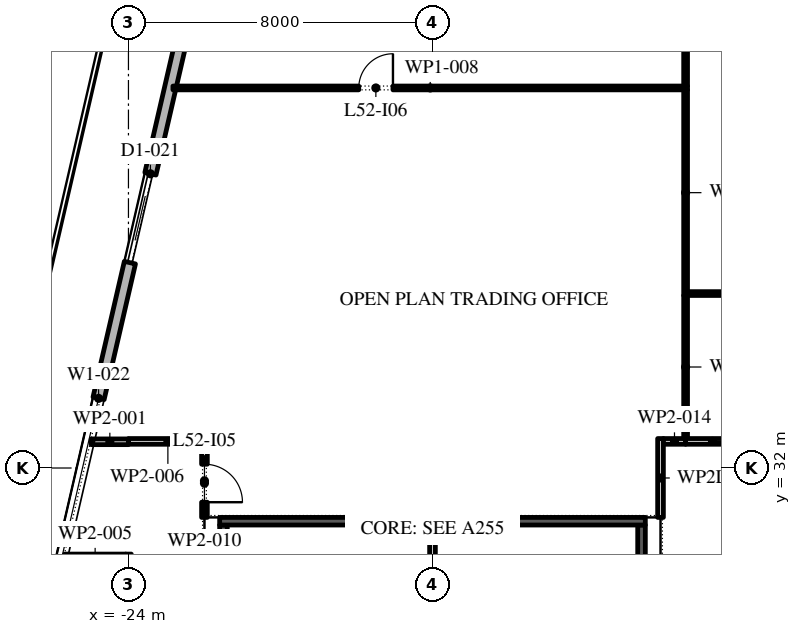
"""IFC4 building model, lengths in metres.
Left out: names, types, materials, properties, quantities, classifications, styles, units other than length and angle.
Written with IfcOpenShell. Run it as: python <this file> out.ifc"""

import sys

from ifc_helpers import new_model, si_unit, direction, frame, frame_2d, origin, origin_2d, place, context, subcontext, project, spatial, rectangle, extrude, element, fill, save


model = new_model("IFC4")
c1 = context("Model", 3, precision=1e-05, world=origin(), true_north=direction((0.0, 1.0)))
c2 = subcontext(c1, "Body", "Model", "MODEL_VIEW")
j1 = project(units=[si_unit("LENGTHUNIT", "METRE"), si_unit("PLANEANGLEUNIT", "RADIAN")], contexts=[c1])
p1 = place(None, origin())
s1 = spatial("IfcSite", under=j1, at=p1, CompositionType="ELEMENT")
p2 = place(p1, origin())
s2 = spatial("IfcBuilding", under=s1, at=p2, CompositionType="ELEMENT")
p3 = place(p2, frame((0.0, 0.0, 243.0)))
s3 = spatial("IfcBuildingStorey", under=s2, at=p3, CompositionType="ELEMENT", Elevation=243.0)
p4 = place(p3, frame((-26.658, 37.062, 0.0), z_axis=(0.014617783326, 0.063169706518, 0.99789574034), x_axis=(-0.974255315496, 0.225447511024, 0.0)))
e1 = element("IfcColumn", 1, at=p4, inside=s3, PredefinedType="COLUMN", context=c2, shape_type="SweptSolid", body=[
    extrude(rectangle(XDim=1.1, YDim=1.1, at=origin_2d()), origin(), (0.0, 0.0, 1.0), 4.209),
])
p5 = place(p3, frame((29.616, 40.758, 0.0), z_axis=(0.0, 0.0, 1.0), x_axis=(-0.974370532314, 0.224949029246, 0.0)))
e2 = element("IfcWall", 2, at=p5, inside=s3, PredefinedType="STANDARD", context=c2, shape_type="SweptSolid", body=[
    extrude(rectangle(XDim=48.0, YDim=0.3, at=frame_2d((24.0, 0.0))), origin(), (0.0, 0.0, 1.0), 4.0),
])
p6 = place(p5, frame((1.625, 0.0, 0.45)))
e3 = element("IfcOpeningElement", 3, at=p6, cuts=e2, PredefinedType="OPENING", context=c2, shape_type="SweptSolid", body=[
    extrude(rectangle(XDim=4.5, YDim=2.675, at=frame_2d((2.25, 1.337))), frame((0.0, 0.16, 0.0), z_axis=(0.0, -1.0, 0.0), x_axis=(1.0, 0.0, 0.0)), (0.0, 0.0, 1.0), 0.32),
])
p7 = place(p5, frame((9.975, 0.0, 0.0)))
e4 = element("IfcOpeningElement", 4, at=p7, cuts=e2, PredefinedType="OPENING", context=c2, shape_type="SweptSolid", body=[
    extrude(rectangle(XDim=2.4, YDim=3.5, at=frame_2d((1.2, 1.75))), frame((0.0, 0.16, 0.0), z_axis=(0.0, -1.0, 0.0), x_axis=(1.0, 0.0, 0.0)), (0.0, 0.0, 1.0), 0.32),
])
p8 = place(p5, frame((17.575, 0.0, 0.45)))
e5 = element("IfcOpeningElement", 5, at=p8, cuts=e2, PredefinedType="OPENING", context=c2, shape_type="SweptSolid", body=[
    extrude(rectangle(XDim=4.5, YDim=2.575, at=frame_2d((2.25, 1.288))), frame((0.0, 0.16, 0.0), z_axis=(0.0, -1.0, 0.0), x_axis=(1.0, 0.0, 0.0)), (0.0, 0.0, 1.0), 0.32),
])
p9 = place(p5, frame((25.625, 0.0, 0.45)))
e6 = element("IfcOpeningElement", 6, at=p9, cuts=e2, PredefinedType="OPENING", context=c2, shape_type="SweptSolid", body=[
    extrude(rectangle(XDim=4.5, YDim=2.45, at=frame_2d((2.25, 1.225))), frame((0.0, 0.16, 0.0), z_axis=(0.0, -1.0, 0.0), x_axis=(1.0, 0.0, 0.0)), (0.0, 0.0, 1.0), 0.32),
])
p10 = place(p5, frame((33.675, 0.0, 0.45)))
e7 = element("IfcOpeningElement", 7, at=p10, cuts=e2, PredefinedType="OPENING", context=c2, shape_type="SweptSolid", body=[
    extrude(rectangle(XDim=4.5, YDim=2.45, at=frame_2d((2.25, 1.225))), frame((0.0, 0.16, 0.0), z_axis=(0.0, -1.0, 0.0), x_axis=(1.0, 0.0, 0.0)), (0.0, 0.0, 1.0), 0.32),
])
p11 = place(p5, frame((42.775, 0.0, 0.0)))
e8 = element("IfcOpeningElement", 8, at=p11, cuts=e2, PredefinedType="OPENING", context=c2, shape_type="SweptSolid", body=[
    extrude(rectangle(XDim=2.4, YDim=3.5, at=frame_2d((1.2, 1.75))), frame((0.0, 0.16, 0.0), z_axis=(0.0, -1.0, 0.0), x_axis=(1.0, 0.0, 0.0)), (0.0, 0.0, 1.0), 0.32),
])
p12 = place(p3, frame((-21.359, 48.678, 0.0), z_axis=(0.0, 0.0, 1.0), x_axis=(-0.224949198343, -0.974370493275, 0.0)))
e9 = element("IfcWall", 9, at=p12, inside=s3, PredefinedType="STANDARD", context=c2, shape_type="SweptSolid", body=[
    extrude(rectangle(XDim=49.5, YDim=0.3, at=frame_2d((24.75, 0.0))), origin(), (0.0, 0.0, 1.0), 4.0),
])
p13 = place(p12, frame((1.157, 0.0, 0.45)))
e10 = element("IfcOpeningElement", 10, at=p13, cuts=e9, PredefinedType="OPENING", context=c2, shape_type="SweptSolid", body=[
    extrude(rectangle(XDim=4.5, YDim=3.05, at=frame_2d((2.25, 1.525))), frame((0.0, 0.16, 0.0), z_axis=(0.0, -1.0, 0.0), x_axis=(1.0, 0.0, 0.0)), (0.0, 0.0, 1.0), 0.32),
])
p14 = place(p12, frame((9.171, 0.0, 0.0)))
e11 = element("IfcOpeningElement", 11, at=p14, cuts=e9, PredefinedType="OPENING", context=c2, shape_type="SweptSolid", body=[
    extrude(rectangle(XDim=2.4, YDim=3.5, at=frame_2d((1.2, 1.75))), frame((0.0, 0.16, 0.0), z_axis=(0.0, -1.0, 0.0), x_axis=(1.0, 0.0, 0.0)), (0.0, 0.0, 1.0), 0.32),
])
p15 = place(p12, frame((15.236, 0.0, 0.45)))
e12 = element("IfcOpeningElement", 12, at=p15, cuts=e9, PredefinedType="OPENING", context=c2, shape_type="SweptSolid", body=[
    extrude(rectangle(XDim=4.5, YDim=3.05, at=frame_2d((2.25, 1.525))), frame((0.0, 0.16, 0.0), z_axis=(0.0, -1.0, 0.0), x_axis=(1.0, 0.0, 0.0)), (0.0, 0.0, 1.0), 0.32),
])
p16 = place(p12, frame((22.35, 0.0, 0.45)))
e13 = element("IfcOpeningElement", 13, at=p16, cuts=e9, PredefinedType="OPENING", context=c2, shape_type="SweptSolid", body=[
    extrude(rectangle(XDim=4.5, YDim=3.05, at=frame_2d((2.25, 1.525))), frame((0.0, 0.16, 0.0), z_axis=(0.0, -1.0, 0.0), x_axis=(1.0, 0.0, 0.0)), (0.0, 0.0, 1.0), 0.32),
])
p17 = place(p12, frame((29.464, 0.0, 0.45)))
e14 = element("IfcOpeningElement", 14, at=p17, cuts=e9, PredefinedType="OPENING", context=c2, shape_type="SweptSolid", body=[
    extrude(rectangle(XDim=4.5, YDim=3.05, at=frame_2d((2.25, 1.525))), frame((0.0, 0.16, 0.0), z_axis=(0.0, -1.0, 0.0), x_axis=(1.0, 0.0, 0.0)), (0.0, 0.0, 1.0), 0.32),
])
p18 = place(p12, frame((37.628, 0.0, 0.0)))
e15 = element("IfcOpeningElement", 15, at=p18, cuts=e9, PredefinedType="OPENING", context=c2, shape_type="SweptSolid", body=[
    extrude(rectangle(XDim=2.4, YDim=3.325, at=frame_2d((1.2, 1.663))), frame((0.0, 0.16, 0.0), z_axis=(0.0, -1.0, 0.0), x_axis=(1.0, 0.0, 0.0)), (0.0, 0.0, 1.0), 0.32),
])
p19 = place(p12, frame((43.693, 0.0, 0.45)))
e16 = element("IfcOpeningElement", 16, at=p19, cuts=e9, PredefinedType="OPENING", context=c2, shape_type="SweptSolid", body=[
    extrude(rectangle(XDim=4.5, YDim=2.825, at=frame_2d((2.25, 1.413))), frame((0.0, 0.16, 0.0), z_axis=(0.0, -1.0, 0.0), x_axis=(1.0, 0.0, 0.0)), (0.0, 0.0, 1.0), 0.32),
])
p20 = place(p3, frame((-21.5, 25.75, 0.0), z_axis=(0.0, 0.0, 1.0), x_axis=(0.0, 1.0, 0.0)))
e17 = element("IfcWall", 17, at=p20, inside=s3, PredefinedType="SHEAR", context=c2, shape_type="SweptSolid", body=[
    extrude(rectangle(XDim=4.75, YDim=0.2, at=frame_2d((2.375, 0.0))), origin(), (0.0, 0.0, 1.0), 4.0),
])
p21 = place(p20, frame((1.925, 0.0, 0.0)))
e18 = element("IfcOpeningElement", 18, at=p21, cuts=e17, PredefinedType="OPENING", context=c2, shape_type="SweptSolid", body=[
    extrude(rectangle(XDim=0.9, YDim=2.1, at=frame_2d((0.45, 1.05))), frame((0.0, 0.11, 0.0), z_axis=(0.0, -1.0, 0.0), x_axis=(1.0, 0.0, 0.0)), (0.0, 0.0, 1.0), 0.22),
])
p22 = place(p3, frame((-10.5, 25.75, 0.0), z_axis=(0.0, 0.0, 1.0), x_axis=(0.0, 1.0, 0.0)))
e19 = element("IfcWall", 19, at=p22, inside=s3, PredefinedType="SHEAR", context=c2, shape_type="SweptSolid", body=[
    extrude(rectangle(XDim=4.75, YDim=0.2, at=frame_2d((2.375, 0.0))), origin(), (0.0, 0.0, 1.0), 4.0),
])
p23 = place(p22, frame((1.925, 0.0, 0.0)))
e20 = element("IfcOpeningElement", 20, at=p23, cuts=e19, PredefinedType="OPENING", context=c2, shape_type="SweptSolid", body=[
    extrude(rectangle(XDim=0.9, YDim=2.1, at=frame_2d((0.45, 1.05))), frame((0.0, 0.11, 0.0), z_axis=(0.0, -1.0, 0.0), x_axis=(1.0, 0.0, 0.0)), (0.0, 0.0, 1.0), 0.22),
])
p24 = place(p3, frame((-21.6, 30.6, 0.0), z_axis=(0.0, 0.0, 1.0), x_axis=(1.0, 0.0, 0.0)))
e21 = element("IfcWall", 21, at=p24, inside=s3, PredefinedType="SHEAR", context=c2, shape_type="SweptSolid", body=[
    extrude(rectangle(XDim=11.2, YDim=0.2, at=frame_2d((5.6, 0.0))), origin(), (0.0, 0.0, 1.0), 4.0),
])
p25 = place(p3, frame((-16.0, 25.75, 0.0), z_axis=(0.0, 0.0, 1.0), x_axis=(0.0, 1.0, 0.0)))
e22 = element("IfcWall", 22, at=p25, inside=s3, PredefinedType="PARTITIONING", context=c2, shape_type="SweptSolid", body=[
    extrude(rectangle(XDim=4.75, YDim=0.15, at=frame_2d((2.375, 0.0))), origin(), (0.0, 0.0, 1.0), 4.0),
])
p26 = place(p3, frame((-24.979, 32.69, 0.0), z_axis=(0.0, 0.0, 1.0), x_axis=(1.0, 0.0, 0.0)))
e23 = element("IfcWall", 23, at=p26, inside=s3, PredefinedType="PARTITIONING", context=c2, shape_type="SweptSolid", body=[
    extrude(rectangle(XDim=0.979, YDim=0.15, at=frame_2d((0.49, 0.0))), origin(), (0.0, 0.0, 1.0), 4.0),
])
p27 = place(p3, frame((-24.0, 32.7, 0.0), z_axis=(0.0, 0.0, 1.0), x_axis=(1.0, 0.0, 0.0)))
e24 = element("IfcWall", 24, at=p27, inside=s3, PredefinedType="PARTITIONING", context=c2, shape_type="SweptSolid", body=[
    extrude(rectangle(XDim=2.075, YDim=0.15, at=frame_2d((1.038, 0.0))), origin(), (0.0, 0.0, 1.0), 4.0),
])
p28 = place(p3, frame((-22.829, 42.0, 0.0), z_axis=(0.0, 0.0, 1.0), x_axis=(1.0, 0.0, 0.0)))
e25 = element("IfcWall", 25, at=p28, inside=s3, PredefinedType="PARTITIONING", context=c2, shape_type="SweptSolid", body=[
    extrude(rectangle(XDim=13.539, YDim=0.1, at=frame_2d((6.77, 0.0))), origin(), (0.0, 0.0, 1.0), 4.0),
])
p29 = place(p28, frame((4.889, 0.0, 0.0)))
e26 = element("IfcOpeningElement", 26, at=p29, cuts=e25, PredefinedType="OPENING", context=c2, shape_type="SweptSolid", body=[
    extrude(rectangle(XDim=0.9, YDim=2.1, at=frame_2d((0.45, 1.05))), frame((0.0, 0.06, 0.0), z_axis=(0.0, -1.0, 0.0), x_axis=(1.0, 0.0, 0.0)), (0.0, 0.0, 1.0), 0.12),
])
p30 = place(p3, frame((-22.0, 32.625, 0.0), z_axis=(0.0, 0.0, 1.0), x_axis=(0.0, -1.0, 0.0)))
e27 = element("IfcWall", 27, at=p30, inside=s3, PredefinedType="PARTITIONING", context=c2, shape_type="SweptSolid", body=[
    extrude(rectangle(XDim=1.925, YDim=0.15, at=frame_2d((0.962, 0.0))), origin(), (0.0, 0.0, 1.0), 4.0),
])
p31 = place(p30, frame((0.525, 0.0, 0.0)))
e28 = element("IfcOpeningElement", 28, at=p31, cuts=e27, PredefinedType="OPENING", context=c2, shape_type="SweptSolid", body=[
    extrude(rectangle(XDim=1.0, YDim=2.1, at=frame_2d((0.5, 1.05))), frame((0.0, 0.085, 0.0), z_axis=(0.0, -1.0, 0.0), x_axis=(1.0, 0.0, 0.0)), (0.0, 0.0, 1.0), 0.17),
])
p32 = place(p3, frame((-10.0, 30.7, 0.0), z_axis=(0.0, 0.0, 1.0), x_axis=(0.0, 1.0, 0.0)))
e29 = element("IfcWall", 29, at=p32, inside=s3, PredefinedType="PARTITIONING", context=c2, shape_type="SweptSolid", body=[
    extrude(rectangle(XDim=2.075, YDim=0.15, at=frame_2d((1.038, 0.0))), origin(), (0.0, 0.0, 1.0), 3.02),
])
p33 = place(p3, frame((-9.925, 32.7, 0.0), z_axis=(0.0, 0.0, 1.0), x_axis=(1.0, 0.0, 0.0)))
e30 = element("IfcWall", 30, at=p33, inside=s3, PredefinedType="PARTITIONING", context=c2, shape_type="SweptSolid", body=[
    extrude(rectangle(XDim=0.585, YDim=0.15, at=frame_2d((0.292, 0.0))), origin(), (0.0, 0.0, 1.0), 4.0),
])
p34 = place(p3, frame((-9.34, 32.775, 0.0), z_axis=(0.0, 0.0, 1.0), x_axis=(0.0, 1.0, 0.0)))
e31 = element("IfcWall", 31, at=p34, inside=s3, PredefinedType="PARTITIONING", context=c2, shape_type="SweptSolid", body=[
    extrude(rectangle(XDim=3.765, YDim=0.1, at=frame_2d((1.883, 0.0))), origin(), (0.0, 0.0, 1.0), 4.0),
])
p35 = place(p3, frame((-9.34, 32.7, 0.0), z_axis=(0.0, 0.0, 1.0), x_axis=(1.0, 0.0, 0.0)))
e32 = element("IfcWall", 32, at=p35, inside=s3, PredefinedType="PARTITIONING", context=c2, shape_type="SweptSolid", body=[
    extrude(rectangle(XDim=1.415, YDim=0.15, at=frame_2d((0.708, 0.0))), origin(), (0.0, 0.0, 1.0), 4.0),
])
p36 = place(p3, frame((-9.34, 36.54, 0.0), z_axis=(0.0, 0.0, 1.0), x_axis=(0.0, 1.0, 0.0)))
e33 = element("IfcWall", 33, at=p36, inside=s3, PredefinedType="PARTITIONING", context=c2, shape_type="SweptSolid", body=[
    extrude(rectangle(XDim=5.41, YDim=0.1, at=frame_2d((2.705, 0.0))), origin(), (0.0, 0.0, 1.0), 4.0),
])
p37 = place(p3, frame((-9.29, 36.59, 0.0), z_axis=(0.0, 0.0, 1.0), x_axis=(1.0, 0.0, 0.0)))
e34 = element("IfcWall", 34, at=p37, inside=s3, PredefinedType="PARTITIONING", context=c2, shape_type="SweptSolid", body=[
    extrude(rectangle(XDim=8.265, YDim=0.1, at=frame_2d((4.133, 0.0))), origin(), (0.0, 0.0, 1.0), 4.0),
])
p38 = place(p3, frame((-9.34, 42.05, 0.0), z_axis=(0.0, 0.0, 1.0), x_axis=(0.0, 1.0, 0.0)))
e35 = element("IfcWall", 35, at=p38, inside=s3, PredefinedType="PARTITIONING", context=c2, shape_type="SweptSolid", body=[
    extrude(rectangle(XDim=7.631, YDim=0.1, at=frame_2d((3.815, 0.0))), origin(), (0.0, 0.0, 1.0), 4.0),
])
p39 = place(p14, origin())
e36 = element("IfcDoor", 36, at=p39, inside=s3, OperationType="DOUBLE_DOOR_SLIDING", PredefinedType="DOOR", context=c2, shape_type="SweptSolid", body=[
    extrude(rectangle(XDim=2.4, YDim=3.5, at=frame_2d((1.2, 1.75))), frame((0.0, 0.025, 0.0), z_axis=(0.0, -1.0, 0.0), x_axis=(1.0, 0.0, 0.0)), (0.0, 0.0, 1.0), 0.05),
])
fill(e11, e36)
p40 = place(p15, origin())
e37 = element("IfcWindow", 37, at=p40, inside=s3, PartitioningType="DOUBLE_PANEL_VERTICAL", PredefinedType="WINDOW", context=c2, shape_type="SweptSolid", body=[
    extrude(rectangle(XDim=4.5, YDim=3.05, at=frame_2d((2.25, 1.525))), frame((0.0, 0.03, 0.0), z_axis=(0.0, -1.0, 0.0), x_axis=(1.0, 0.0, 0.0)), (0.0, 0.0, 1.0), 0.06),
])
fill(e12, e37)
p41 = place(p31, origin())
e38 = element("IfcDoor", 38, at=p41, inside=s3, OperationType="SINGLE_SWING_LEFT", PredefinedType="DOOR", context=c2, shape_type="SweptSolid", body=[
    extrude(rectangle(XDim=1.0, YDim=2.1, at=frame_2d((0.5, 1.05))), frame((0.0, 0.025, 0.0), z_axis=(0.0, -1.0, 0.0), x_axis=(1.0, 0.0, 0.0)), (0.0, 0.0, 1.0), 0.05),
])
fill(e28, e38)
p42 = place(p29, origin())
e39 = element("IfcDoor", 39, at=p42, inside=s3, OperationType="SINGLE_SWING_LEFT", PredefinedType="DOOR", context=c2, shape_type="SweptSolid", body=[
    extrude(rectangle(XDim=0.9, YDim=2.1, at=frame_2d((0.45, 1.05))), frame((0.0, 0.025, 0.0), z_axis=(0.0, -1.0, 0.0), x_axis=(1.0, 0.0, 0.0)), (0.0, 0.0, 1.0), 0.05),
])
fill(e26, e39)
save(model, sys.argv[1])
